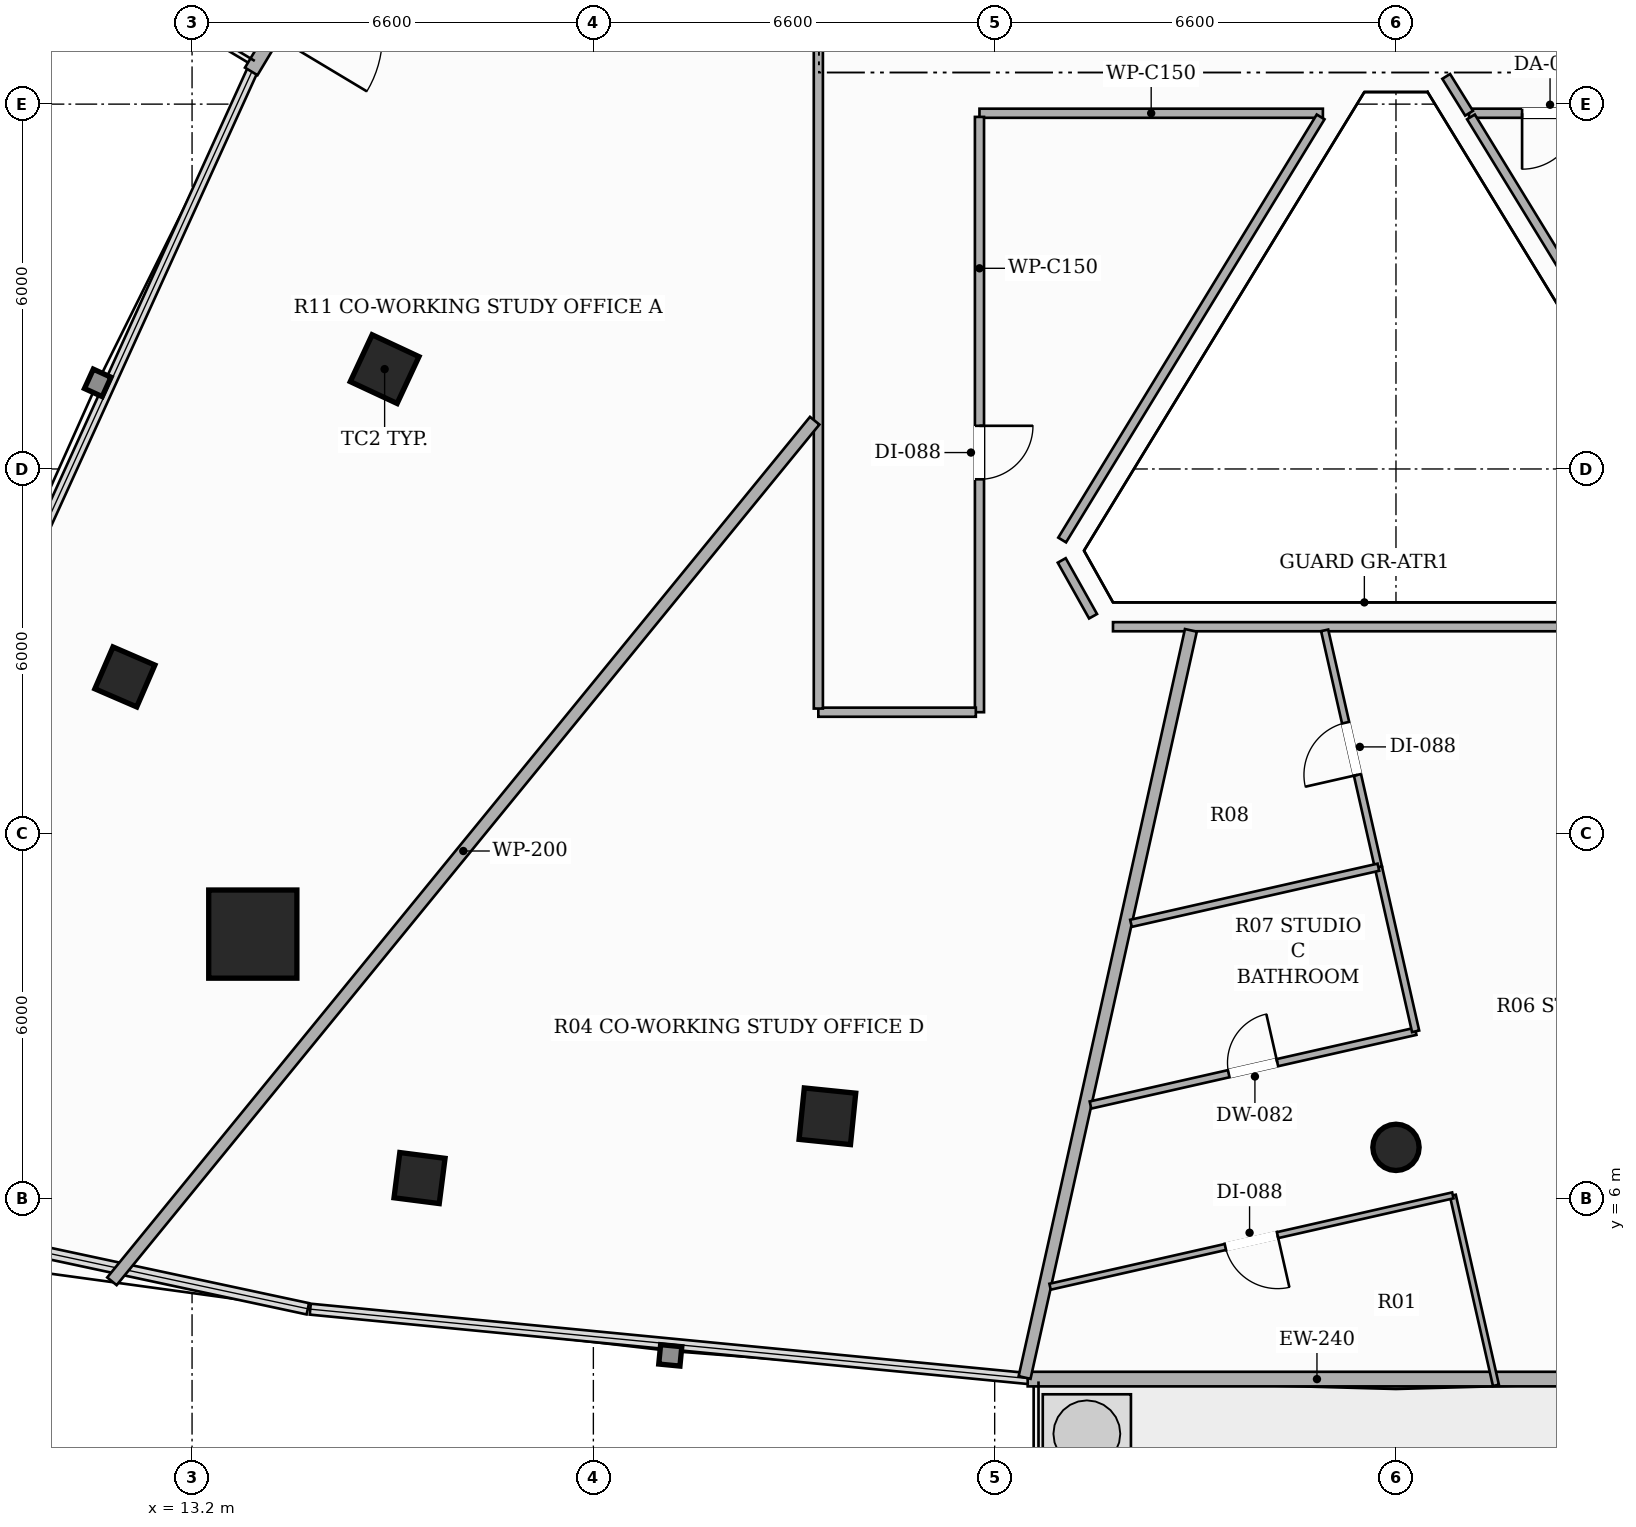
"""IFC4 building model, lengths in metres.
Left out: names, types, materials, properties, quantities, classifications, styles, units other than length and angle.
Written with IfcOpenShell. Run it as: python <this file> out.ifc"""

import sys

from ifc_helpers import new_model, si_unit, direction, frame, frame_2d, origin, origin_2d, place, context, subcontext, project, spatial, rectangle, hollow_rectangle, hollow_circle, extrude, element, fill, save


model = new_model("IFC4")
c1 = context("Model", 3, precision=1e-05, world=origin(), true_north=direction((0.0, 1.0)))
c2 = subcontext(c1, "Body", "Model", "MODEL_VIEW")
j1 = project(units=[si_unit("LENGTHUNIT", "METRE"), si_unit("PLANEANGLEUNIT", "RADIAN")], contexts=[c1])
p1 = place(None, origin())
s1 = spatial("IfcSite", under=j1, at=p1, CompositionType="ELEMENT")
p2 = place(p1, origin())
s2 = spatial("IfcBuilding", under=s1, at=p2, CompositionType="ELEMENT")
p3 = place(p2, frame((0.0, 0.0, 119.9)))
s3 = spatial("IfcBuildingStorey", under=s2, at=p3, CompositionType="ELEMENT", Elevation=119.9)
p4 = place(p3, frame((14.199, 10.351, 0.0), z_axis=(0.0, 0.0, 1.0), x_axis=(1.0, 0.0, 0.0)))
e1 = element("IfcColumn", 1, at=p4, inside=s3, PredefinedType="COLUMN", context=c2, shape_type="SweptSolid", body=[
    extrude(hollow_rectangle(XDim=1.45, YDim=1.45, WallThickness=0.045, at=origin_2d()), origin(), (0.0, 0.0, 1.0), 3.3),
])
for number, where, z_axis, x_axis in (
    (2, (16.367, 19.642, 0.0), (0.0, 0.0, 1.0), (0.423, 0.906, 0.0)),
    (3, (23.649, 7.355, 0.0), (0.0, 0.0, 1.0), (-0.995, 0.101, 0.0)),
):
    element("IfcColumn", number, at=place(p3, frame(where, z_axis=z_axis, x_axis=x_axis)), inside=s3, PredefinedType="COLUMN", context=c2, shape_type="SweptSolid", body=[
        extrude(hollow_rectangle(XDim=0.85, YDim=0.85, WallThickness=0.028, at=origin_2d()), origin(), (0.0, 0.0, 1.0), 3.3),
    ])
p5 = place(p3, frame((33.0, 6.844, 0.0), z_axis=(0.0, 0.0, 1.0), x_axis=(1.0, 0.0, 0.0)))
e4 = element("IfcColumn", 4, at=p5, inside=s3, PredefinedType="COLUMN", context=c2, shape_type="SweptSolid", body=[
    extrude(hollow_circle(Radius=0.381, WallThickness=0.022, at=origin_2d()), origin(), (0.0, 0.0, 1.0), 3.3),
])
for number, where, z_axis, x_axis in (
    (5, (12.095, 14.58, 0.0), (0.0, 0.0, 1.0), (0.397, 0.918, 0.0)),
    (6, (16.941, 6.339, 0.0), (0.0, 0.0, 1.0), (-0.992, 0.127, 0.0)),
):
    element("IfcColumn", number, at=place(p3, frame(where, z_axis=z_axis, x_axis=x_axis)), inside=s3, PredefinedType="COLUMN", context=c2, shape_type="SweptSolid", body=[
        extrude(hollow_rectangle(XDim=0.75, YDim=0.75, WallThickness=0.025, at=origin_2d()), origin(), (0.0, 0.0, 1.0), 3.3),
    ])
p6 = place(p3, frame((20.2, 34.586, 0.0), z_axis=(0.0, 0.0, 1.0), x_axis=(-0.514379309275, -0.857562782652, 0.0)))
e7 = element("IfcWall", 7, at=p6, inside=s3, PredefinedType="SOLIDWALL", context=c2, shape_type="SweptSolid", body=[
    extrude(rectangle(XDim=11.717, YDim=0.24, at=frame_2d((5.858, 0.0))), origin(), (0.0, 0.0, 1.0), 2.624),
])
p7 = place(p6, frame((9.22, 0.0, 0.0)))
e8 = element("IfcOpeningElement", 8, at=p7, cuts=e7, PredefinedType="OPENING", context=c2, shape_type="SweptSolid", body=[
    extrude(rectangle(XDim=1.8, YDim=2.2, at=frame_2d((0.9, 1.1))), frame((0.0, 0.13, 0.0), z_axis=(0.0, -1.0, 0.0), x_axis=(1.0, 0.0, 0.0)), (0.0, 0.0, 1.0), 0.26),
])
p8 = place(p3, frame((26.943, 3.033, 0.0), z_axis=(0.0, 0.0, 1.0), x_axis=(1.0, 0.0, 0.0)))
e9 = element("IfcWall", 9, at=p8, inside=s3, PredefinedType="SOLIDWALL", context=c2, shape_type="SweptSolid", body=[
    extrude(rectangle(XDim=12.114, YDim=0.24, at=frame_2d((6.057, 0.0))), origin(), (0.0, 0.0, 1.0), 2.624),
])
p9 = place(p8, frame((9.615, 0.0, 0.0)))
e10 = element("IfcOpeningElement", 10, at=p9, cuts=e9, PredefinedType="OPENING", context=c2, shape_type="SweptSolid", body=[
    extrude(rectangle(XDim=1.8, YDim=2.2, at=frame_2d((0.9, 1.1))), frame((0.0, 0.13, 0.0), z_axis=(0.0, -1.0, 0.0), x_axis=(1.0, 0.0, 0.0)), (0.0, 0.0, 1.0), 0.26),
])
p10 = place(p3, frame((31.798, 23.85, 0.0), z_axis=(0.0, 0.0, 1.0), x_axis=(-1.0, 0.0, 0.0)))
e11 = element("IfcWall", 11, at=p10, inside=s3, PredefinedType="PARTITIONING", context=c2, shape_type="SweptSolid", body=[
    extrude(rectangle(XDim=5.648, YDim=0.15, at=frame_2d((2.824, 0.0))), origin(), (0.0, 0.0, 1.0), 2.721),
])
p11 = place(p3, frame((26.15, 23.79, 0.0), z_axis=(0.0, 0.0, 1.0), x_axis=(0.0, -1.0, 0.0)))
e12 = element("IfcWall", 12, at=p11, inside=s3, PredefinedType="PARTITIONING", context=c2, shape_type="SweptSolid", body=[
    extrude(rectangle(XDim=9.79, YDim=0.15, at=frame_2d((4.895, 0.0))), origin(), (0.0, 0.0, 1.0), 2.721),
])
p12 = place(p11, frame((5.08, 0.0, 0.0)))
e13 = element("IfcOpeningElement", 13, at=p12, cuts=e12, PredefinedType="OPENING", context=c2, shape_type="SweptSolid", body=[
    extrude(rectangle(XDim=0.88, YDim=2.1, at=frame_2d((0.44, 1.05))), frame((0.0, 0.085, 0.0), z_axis=(0.0, -1.0, 0.0), x_axis=(1.0, 0.0, 0.0)), (0.0, 0.0, 1.0), 0.17),
])
p13 = place(p3, frame((26.09, 14.0, 0.0), z_axis=(0.0, 0.0, 1.0), x_axis=(-1.0, 0.0, 0.0)))
e14 = element("IfcWall", 14, at=p13, inside=s3, PredefinedType="PARTITIONING", context=c2, shape_type="SweptSolid", body=[
    extrude(rectangle(XDim=2.59, YDim=0.15, at=frame_2d((1.295, 0.0))), origin(), (0.0, 0.0, 1.0), 2.721),
])
p14 = place(p3, frame((23.5, 14.06, 0.0), z_axis=(0.0, 0.0, 1.0), x_axis=(0.0, 1.0, 0.0)))
e15 = element("IfcWall", 15, at=p14, inside=s3, PredefinedType="PARTITIONING", context=c2, shape_type="SweptSolid", body=[
    extrude(rectangle(XDim=22.84, YDim=0.15, at=frame_2d((11.42, 0.0))), origin(), (0.0, 0.0, 1.0), 2.413),
])
p15 = place(p14, frame((13.17, 0.0, 0.0)))
e16 = element("IfcOpeningElement", 16, at=p15, cuts=e15, PredefinedType="OPENING", context=c2, shape_type="SweptSolid", body=[
    extrude(rectangle(XDim=0.88, YDim=2.1, at=frame_2d((0.44, 1.05))), frame((0.0, 0.085, 0.0), z_axis=(0.0, -1.0, 0.0), x_axis=(1.0, 0.0, 0.0)), (0.0, 0.0, 1.0), 0.17),
])
p16 = place(p3, frame((42.29, 23.85, 0.0), z_axis=(0.0, 0.0, 1.0), x_axis=(-1.0, 0.0, 0.0)))
e17 = element("IfcWall", 17, at=p16, inside=s3, PredefinedType="PARTITIONING", context=c2, shape_type="SweptSolid", body=[
    extrude(rectangle(XDim=8.088, YDim=0.15, at=frame_2d((4.044, 0.0))), origin(), (0.0, 0.0, 1.0), 2.492),
])
p17 = place(p16, frame((2.567, 0.0, 0.0)))
e18 = element("IfcOpeningElement", 18, at=p17, cuts=e17, PredefinedType="OPENING", context=c2, shape_type="SweptSolid", body=[
    extrude(rectangle(XDim=0.92, YDim=2.15, at=frame_2d((0.46, 1.075))), frame((0.0, 0.085, 0.0), z_axis=(0.0, -1.0, 0.0), x_axis=(1.0, 0.0, 0.0)), (0.0, 0.0, 1.0), 0.17),
])
p18 = place(p16, frame((6.296, 0.0, 0.0)))
e19 = element("IfcOpeningElement", 19, at=p18, cuts=e17, PredefinedType="OPENING", context=c2, shape_type="SweptSolid", body=[
    extrude(rectangle(XDim=0.92, YDim=2.15, at=frame_2d((0.46, 1.075))), frame((0.0, 0.085, 0.0), z_axis=(0.0, -1.0, 0.0), x_axis=(1.0, 0.0, 0.0)), (0.0, 0.0, 1.0), 0.17),
])
p19 = place(p3, frame((34.202, 23.85, 0.0), z_axis=(0.0, 0.0, 1.0), x_axis=(-0.527226500772, 0.849724788907, 0.0)))
e20 = element("IfcWall", 20, at=p19, inside=s3, PredefinedType="PARTITIONING", context=c2, shape_type="SweptSolid", body=[
    extrude(rectangle(XDim=0.713, YDim=0.15, at=frame_2d((0.356, 0.0))), origin(), (0.0, 0.0, 1.0), 3.06),
])
p20 = place(p3, frame((34.233, 23.79, 0.0), z_axis=(0.0, 0.0, 1.0), x_axis=(0.521893040745, -0.853010934292, 0.0)))
e21 = element("IfcWall", 21, at=p20, inside=s3, PredefinedType="PARTITIONING", context=c2, shape_type="SweptSolid", body=[
    extrude(rectangle(XDim=8.157, YDim=0.15, at=frame_2d((4.079, 0.0))), origin(), (0.0, 0.0, 1.0), 2.721),
])
p21 = place(p3, frame((37.654, 15.406, 0.0), z_axis=(0.0, 0.0, 1.0), x_axis=(-1.0, 0.0, 0.0)))
e22 = element("IfcWall", 22, at=p21, inside=s3, PredefinedType="PARTITIONING", context=c2, shape_type="SweptSolid", body=[
    extrude(rectangle(XDim=9.308, YDim=0.15, at=frame_2d((4.654, 0.0))), origin(), (0.0, 0.0, 1.0), 2.721),
])
p22 = place(p3, frame((28.018, 15.578, 0.0), z_axis=(0.0, 0.0, 1.0), x_axis=(-0.489281087794, 0.872126147485, 0.0)))
e23 = element("IfcWall", 23, at=p22, inside=s3, PredefinedType="PARTITIONING", context=c2, shape_type="SweptSolid", body=[
    extrude(rectangle(XDim=1.053, YDim=0.15, at=frame_2d((0.526, 0.0))), origin(), (0.0, 0.0, 1.0), 3.06),
])
p23 = place(p3, frame((27.51, 16.832, 0.0), z_axis=(0.0, 0.0, 1.0), x_axis=(0.521348270591, 0.853343999072, 0.0)))
e24 = element("IfcWall", 24, at=p23, inside=s3, PredefinedType="PARTITIONING", context=c2, shape_type="SweptSolid", body=[
    extrude(rectangle(XDim=8.154, YDim=0.15, at=frame_2d((4.077, 0.0))), origin(), (0.0, 0.0, 1.0), 2.721),
])
p24 = place(p3, frame((23.44, 18.794, 0.0), z_axis=(0.0, 0.0, 1.0), x_axis=(-0.632525219644, -0.774539764321, 0.0)))
e25 = element("IfcWall", 25, at=p24, inside=s3, PredefinedType="PARTITIONING", context=c2, shape_type="SweptSolid", body=[
    extrude(rectangle(XDim=18.272, YDim=0.2, at=frame_2d((9.136, 0.0))), origin(), (0.0, 0.0, 1.0), 2.413),
])
p25 = place(p3, frame((26.892, 3.059, 0.0), z_axis=(0.0, 0.0, 1.0), x_axis=(0.217267240277, 0.97611215867, 0.0)))
e26 = element("IfcWall", 26, at=p25, inside=s3, PredefinedType="PARTITIONING", context=c2, shape_type="SweptSolid", body=[
    extrude(rectangle(XDim=12.588, YDim=0.2, at=frame_2d((6.294, 0.0))), origin(), (0.0, 0.0, 1.0), 2.413),
])
p26 = place(p3, frame((27.976, 7.54, 0.0), z_axis=(0.0, 0.0, 1.0), x_axis=(0.975262605336, 0.221049430295, 0.0)))
e27 = element("IfcWall", 27, at=p26, inside=s3, PredefinedType="PARTITIONING", context=c2, shape_type="SweptSolid", body=[
    extrude(rectangle(XDim=5.483, YDim=0.12, at=frame_2d((2.741, 0.0))), origin(), (0.0, 0.0, 1.0), 2.413),
])
p27 = place(p26, frame((2.331, 0.0, 0.0)))
e28 = element("IfcOpeningElement", 28, at=p27, cuts=e27, PredefinedType="OPENING", context=c2, shape_type="SweptSolid", body=[
    extrude(rectangle(XDim=0.82, YDim=2.1, at=frame_2d((0.41, 1.05))), frame((0.0, 0.07, 0.0), z_axis=(0.0, -1.0, 0.0), x_axis=(1.0, 0.0, 0.0)), (0.0, 0.0, 1.0), 0.14),
])
p28 = place(p3, frame((33.323, 8.752, 0.0), z_axis=(0.0, 0.0, 1.0), x_axis=(-0.221159716637, 0.975237601683, 0.0)))
e29 = element("IfcWall", 29, at=p28, inside=s3, PredefinedType="PARTITIONING", context=c2, shape_type="SweptSolid", body=[
    extrude(rectangle(XDim=2.768, YDim=0.12, at=frame_2d((1.384, 0.0))), origin(), (0.0, 0.0, 1.0), 2.721),
])
p29 = place(p3, frame((32.711, 11.451, 0.0), z_axis=(0.0, 0.0, 1.0), x_axis=(-0.221335761288, 0.975197662413, 0.0)))
e30 = element("IfcWall", 30, at=p29, inside=s3, PredefinedType="PARTITIONING", context=c2, shape_type="SweptSolid", body=[
    extrude(rectangle(XDim=3.994, YDim=0.12, at=frame_2d((1.997, 0.0))), origin(), (0.0, 0.0, 1.0), 2.721),
])
p30 = place(p29, frame((1.557, 0.0, 0.0)))
e31 = element("IfcOpeningElement", 31, at=p30, cuts=e30, PredefinedType="OPENING", context=c2, shape_type="SweptSolid", body=[
    extrude(rectangle(XDim=0.88, YDim=2.1, at=frame_2d((0.44, 1.05))), frame((0.0, 0.07, 0.0), z_axis=(0.0, -1.0, 0.0), x_axis=(1.0, 0.0, 0.0)), (0.0, 0.0, 1.0), 0.14),
])
p31 = place(p3, frame((34.644, 2.93, 0.0), z_axis=(0.0, 0.0, 1.0), x_axis=(-0.22131804383, 0.975201683487, 0.0)))
e32 = element("IfcWall", 32, at=p31, inside=s3, PredefinedType="PARTITIONING", context=c2, shape_type="SweptSolid", body=[
    extrude(rectangle(XDim=3.203, YDim=0.1, at=frame_2d((1.602, 0.0))), origin(), (0.0, 0.0, 1.0), 3.06),
])
p32 = place(p3, frame((33.935, 6.054, 0.0), z_axis=(0.0, 0.0, 1.0), x_axis=(-0.975244308244, -0.221130140952, 0.0)))
e33 = element("IfcWall", 33, at=p32, inside=s3, PredefinedType="PARTITIONING", context=c2, shape_type="SweptSolid", body=[
    extrude(rectangle(XDim=6.792, YDim=0.1, at=frame_2d((3.396, 0.0))), origin(), (0.0, 0.0, 1.0), 3.06),
])
p33 = place(p32, frame((2.956, 0.0, 0.0)))
e34 = element("IfcOpeningElement", 34, at=p33, cuts=e33, PredefinedType="OPENING", context=c2, shape_type="SweptSolid", body=[
    extrude(rectangle(XDim=0.88, YDim=2.1, at=frame_2d((0.44, 1.05))), frame((0.0, 0.06, 0.0), z_axis=(0.0, -1.0, 0.0), x_axis=(1.0, 0.0, 0.0)), (0.0, 0.0, 1.0), 0.12),
])
p34 = place(p3, frame((28.642, 10.528, 0.0), z_axis=(0.0, 0.0, 1.0), x_axis=(0.975230479555, 0.221191120408, 0.0)))
e35 = element("IfcWall", 35, at=p34, inside=s3, PredefinedType="PARTITIONING", context=c2, shape_type="SweptSolid", body=[
    extrude(rectangle(XDim=4.172, YDim=0.12, at=frame_2d((2.086, 0.0))), origin(), (0.0, 0.0, 1.0), 2.721),
])
p35 = place(p18, origin())
e36 = element("IfcDoor", 36, at=p35, inside=s3, OperationType="SINGLE_SWING_RIGHT", PredefinedType="DOOR", context=c2, shape_type="SweptSolid", body=[
    extrude(rectangle(XDim=0.92, YDim=2.15, at=frame_2d((0.46, 1.075))), frame((0.0, 0.025, 0.0), z_axis=(0.0, -1.0, 0.0), x_axis=(1.0, 0.0, 0.0)), (0.0, 0.0, 1.0), 0.05),
])
fill(e19, e36)
p36 = place(p27, origin())
e37 = element("IfcDoor", 37, at=p36, inside=s3, OperationType="SINGLE_SWING_RIGHT", PredefinedType="DOOR", context=c2, shape_type="SweptSolid", body=[
    extrude(rectangle(XDim=0.82, YDim=2.1, at=frame_2d((0.41, 1.05))), frame((0.0, 0.025, 0.0), z_axis=(0.0, -1.0, 0.0), x_axis=(1.0, 0.0, 0.0)), (0.0, 0.0, 1.0), 0.05),
])
fill(e28, e37)
p37 = place(p30, origin())
e38 = element("IfcDoor", 38, at=p37, inside=s3, OperationType="SINGLE_SWING_LEFT", PredefinedType="DOOR", context=c2, shape_type="SweptSolid", body=[
    extrude(rectangle(XDim=0.88, YDim=2.1, at=frame_2d((0.44, 1.05))), frame((0.0, 0.025, 0.0), z_axis=(0.0, -1.0, 0.0), x_axis=(1.0, 0.0, 0.0)), (0.0, 0.0, 1.0), 0.05),
])
fill(e31, e38)
p38 = place(p33, origin())
e39 = element("IfcDoor", 39, at=p38, inside=s3, OperationType="SINGLE_SWING_LEFT", PredefinedType="DOOR", context=c2, shape_type="SweptSolid", body=[
    extrude(rectangle(XDim=0.88, YDim=2.1, at=frame_2d((0.44, 1.05))), frame((0.0, 0.025, 0.0), z_axis=(0.0, -1.0, 0.0), x_axis=(1.0, 0.0, 0.0)), (0.0, 0.0, 1.0), 0.05),
])
fill(e34, e39)
p39 = place(p12, origin())
e40 = element("IfcDoor", 40, at=p39, inside=s3, OperationType="SINGLE_SWING_LEFT", PredefinedType="DOOR", context=c2, shape_type="SweptSolid", body=[
    extrude(rectangle(XDim=0.88, YDim=2.1, at=frame_2d((0.44, 1.05))), frame((0.0, 0.025, 0.0), z_axis=(0.0, -1.0, 0.0), x_axis=(1.0, 0.0, 0.0)), (0.0, 0.0, 1.0), 0.05),
])
fill(e13, e40)
save(model, sys.argv[1])
